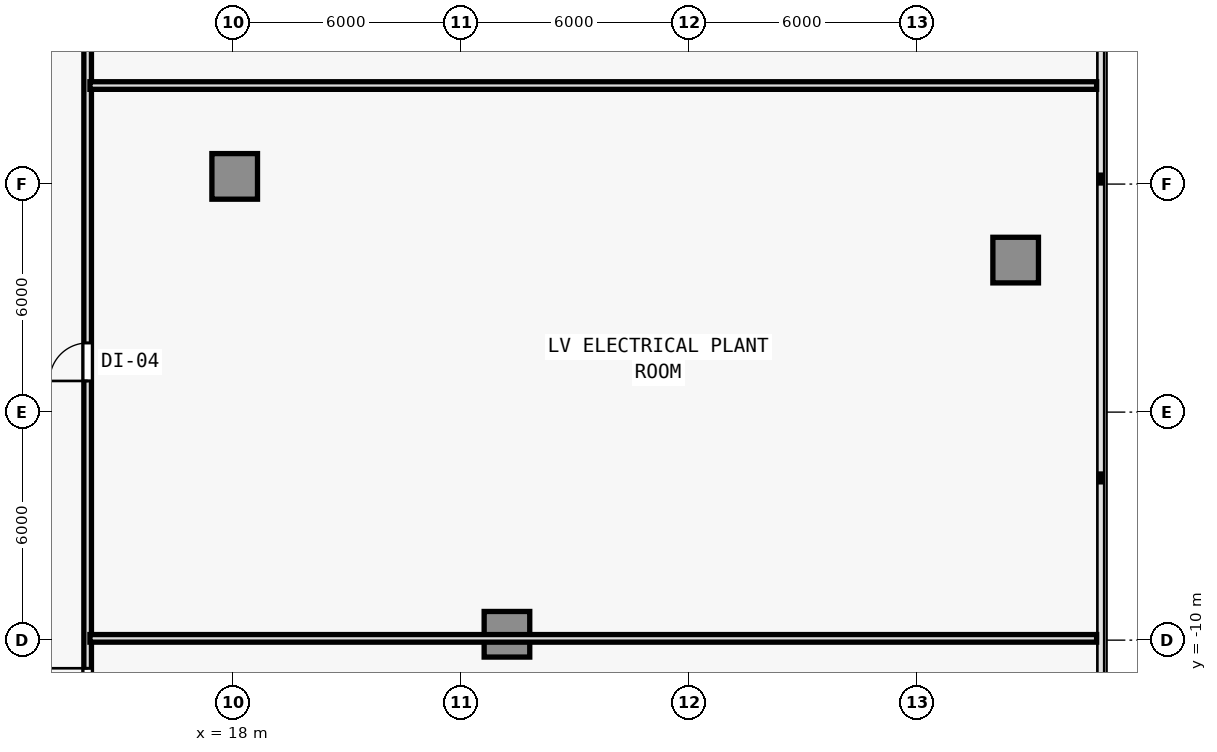
"""IFC4 building model, lengths in metres.
Left out: names, types, materials, properties, quantities, classifications, styles, units other than length and angle.
Written with IfcOpenShell. Run it as: python <this file> out.ifc"""

import sys

from ifc_helpers import new_model, si_unit, direction, frame, frame_2d, origin, origin_2d, place, context, subcontext, project, spatial, rectangle, extrude, element, fill, save


model = new_model("IFC4")
c1 = context("Model", 3, precision=1e-05, world=origin(), true_north=direction((0.0, 1.0)))
c2 = subcontext(c1, "Body", "Model", "MODEL_VIEW")
j1 = project(units=[si_unit("LENGTHUNIT", "METRE"), si_unit("PLANEANGLEUNIT", "RADIAN")], contexts=[c1])
p1 = place(None, origin())
s1 = spatial("IfcSite", under=j1, at=p1, CompositionType="ELEMENT")
p2 = place(p1, origin())
s2 = spatial("IfcBuilding", under=s1, at=p2, CompositionType="ELEMENT")
p3 = place(p2, frame((0.0, 0.0, 21.8)))
s3 = spatial("IfcBuildingStorey", under=s2, at=p3, CompositionType="ELEMENT", Elevation=21.8)
for number, where, z_axis, x_axis in (
    (1, (38.6, 0.0, 0.0), (0.0, 0.0, 1.0), (1.0, 0.0, 0.0)),
    (2, (25.213, -9.845, 0.0), (0.0, 0.0, 1.0), (1.0, 0.0, 0.0)),
    (3, (18.05, 2.202, 0.0), (0.0, 0.0, 1.0), (1.0, 0.0, 0.0)),
):
    element("IfcColumn", number, at=place(p3, frame(where, z_axis=z_axis, x_axis=x_axis)), inside=s3, PredefinedType="COLUMN", context=c2, shape_type="SweptSolid", body=[
        extrude(rectangle(XDim=1.2, YDim=1.2, at=origin_2d()), origin(), (0.0, 0.0, 1.0), 4.6),
    ])
p4 = place(p3, frame((14.18, -12.68, 0.0), z_axis=(0.0, 0.0, 1.0), x_axis=(0.0, 1.0, 0.0)))
e4 = element("IfcWall", 4, at=p4, inside=s3, PredefinedType="SOLIDWALL", context=c2, shape_type="SweptSolid", body=[
    extrude(rectangle(XDim=26.16, YDim=0.2, at=frame_2d((13.08, 0.0))), origin(), (0.0, 0.0, 1.0), 3.025),
])
p5 = place(p4, frame((0.94, 0.0, 0.0)))
e5 = element("IfcOpeningElement", 5, at=p5, cuts=e4, PredefinedType="OPENING", context=c2, shape_type="SweptSolid", body=[
    extrude(rectangle(XDim=1.0, YDim=2.15, at=frame_2d((0.5, 1.075))), frame((0.0, 0.11, 0.0), z_axis=(0.0, -1.0, 0.0), x_axis=(1.0, 0.0, 0.0)), (0.0, 0.0, 1.0), 0.22),
])
p6 = place(p4, frame((9.5, 0.0, 0.0)))
e6 = element("IfcOpeningElement", 6, at=p6, cuts=e4, PredefinedType="OPENING", context=c2, shape_type="SweptSolid", body=[
    extrude(rectangle(XDim=1.0, YDim=2.15, at=frame_2d((0.5, 1.075))), frame((0.0, 0.11, 0.0), z_axis=(0.0, -1.0, 0.0), x_axis=(1.0, 0.0, 0.0)), (0.0, 0.0, 1.0), 0.22),
])
p7 = place(p4, frame((21.14, 0.0, 0.0)))
e7 = element("IfcOpeningElement", 7, at=p7, cuts=e4, PredefinedType="OPENING", context=c2, shape_type="SweptSolid", body=[
    extrude(rectangle(XDim=1.0, YDim=2.15, at=frame_2d((0.5, 1.075))), frame((0.0, 0.11, 0.0), z_axis=(0.0, -1.0, 0.0), x_axis=(1.0, 0.0, 0.0)), (0.0, 0.0, 1.0), 0.22),
])
p8 = place(p3, frame((14.24, -9.953, 0.0), z_axis=(0.0, 0.0, 1.0), x_axis=(1.0, 0.0, 0.0)))
e8 = element("IfcWall", 8, at=p8, inside=s3, PredefinedType="SOLIDWALL", context=c2, shape_type="SweptSolid", body=[
    extrude(rectangle(XDim=26.49, YDim=0.2, at=frame_2d((13.245, 0.0))), origin(), (0.0, 0.0, 1.0), 2.925),
])
p9 = place(p3, frame((14.24, 4.593, 0.0), z_axis=(0.0, 0.0, 1.0), x_axis=(1.0, 0.0, 0.0)))
e9 = element("IfcWall", 9, at=p9, inside=s3, PredefinedType="SOLIDWALL", context=c2, shape_type="SweptSolid", body=[
    extrude(rectangle(XDim=26.49, YDim=0.2, at=frame_2d((13.245, 0.0))), origin(), (0.0, 0.0, 1.0), 3.025),
])
p10 = place(p5, origin())
e10 = element("IfcDoor", 10, at=p10, inside=s3, OperationType="SINGLE_SWING_RIGHT", PredefinedType="DOOR", context=c2, shape_type="SweptSolid", body=[
    extrude(rectangle(XDim=1.0, YDim=2.15, at=frame_2d((0.5, 1.075))), frame((0.0, 0.025, 0.0), z_axis=(0.0, -1.0, 0.0), x_axis=(1.0, 0.0, 0.0)), (0.0, 0.0, 1.0), 0.05),
])
fill(e5, e10)
p11 = place(p6, origin())
e11 = element("IfcDoor", 11, at=p11, inside=s3, OperationType="SINGLE_SWING_LEFT", PredefinedType="DOOR", context=c2, shape_type="SweptSolid", body=[
    extrude(rectangle(XDim=1.0, YDim=2.15, at=frame_2d((0.5, 1.075))), frame((0.0, 0.025, 0.0), z_axis=(0.0, -1.0, 0.0), x_axis=(1.0, 0.0, 0.0)), (0.0, 0.0, 1.0), 0.05),
])
fill(e6, e11)
save(model, sys.argv[1])
